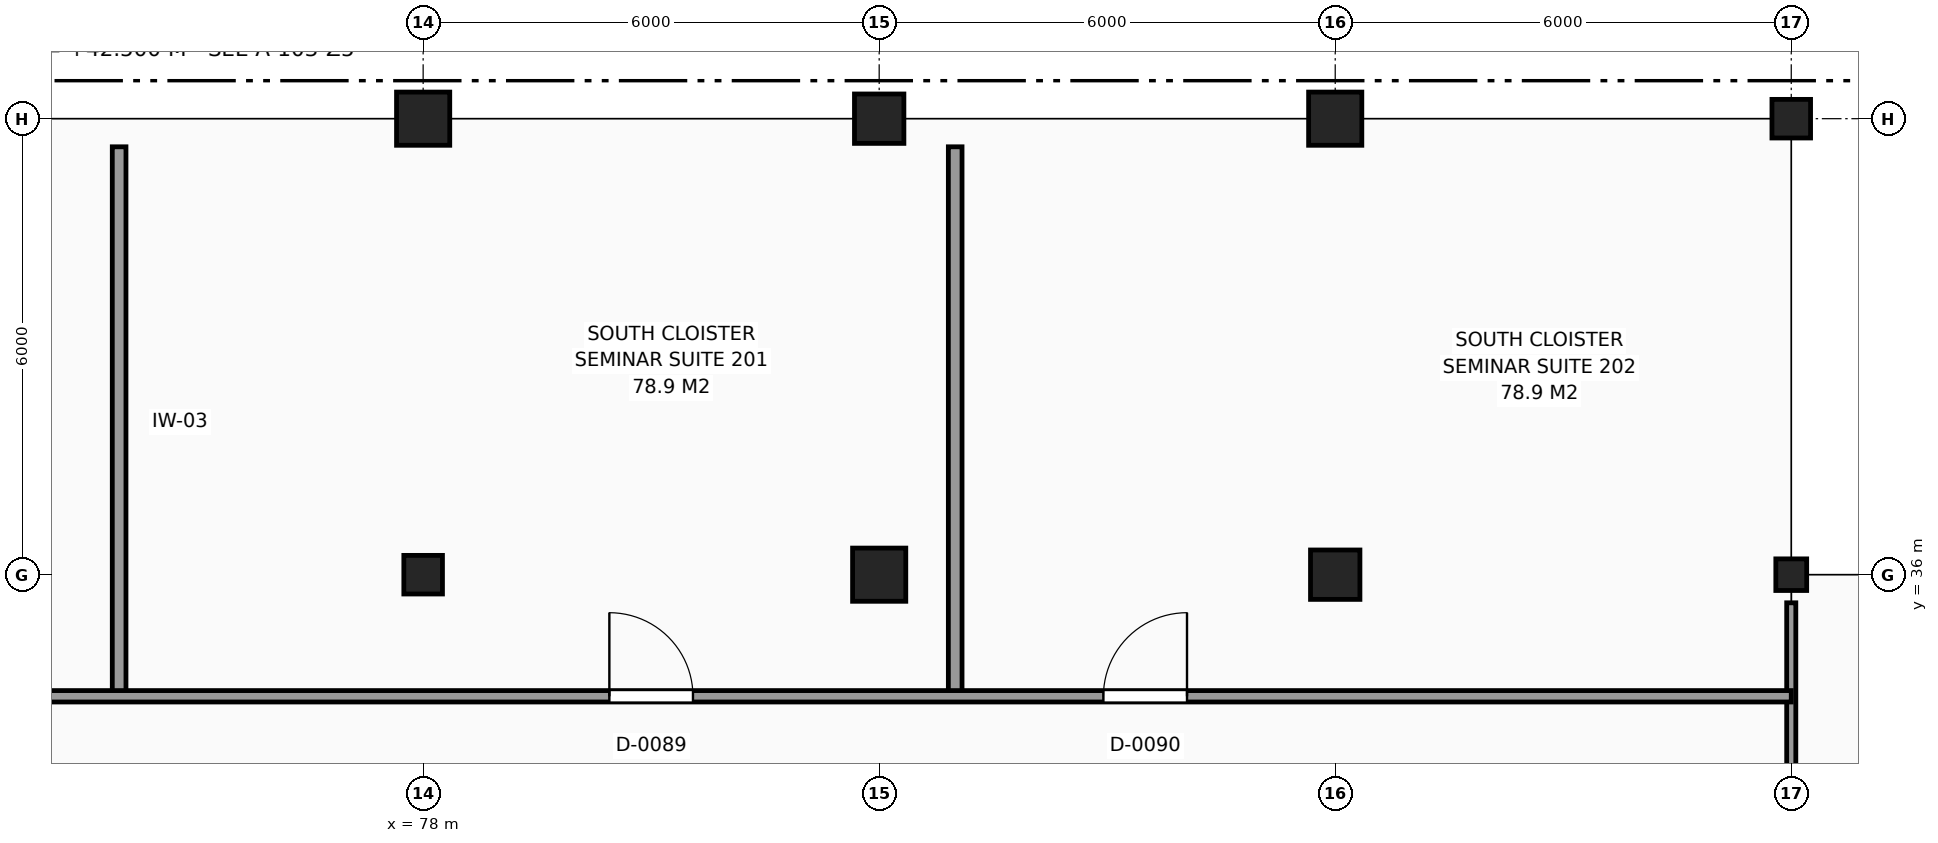
"""IFC4 building model, lengths in metres.
Left out: names, types, materials, properties, quantities, classifications, styles, units other than length and angle.
Written with IfcOpenShell. Run it as: python <this file> out.ifc"""

import sys

from ifc_helpers import new_model, si_unit, direction, frame, frame_2d, origin, origin_2d, place, context, subcontext, project, spatial, rectangle, circle, hollow_circle, i_section, extrude, element, fill, save


model = new_model("IFC4")
c1 = context("Model", 3, precision=1e-05, world=origin(), true_north=direction((0.0, 1.0)))
c2 = subcontext(c1, "Body", "Model", "MODEL_VIEW")
j1 = project(units=[si_unit("LENGTHUNIT", "METRE"), si_unit("PLANEANGLEUNIT", "RADIAN")], contexts=[c1])
p1 = place(None, origin())
s1 = spatial("IfcSite", under=j1, at=p1, CompositionType="ELEMENT")
p2 = place(p1, origin())
s2 = spatial("IfcBuilding", under=s1, at=p2, CompositionType="ELEMENT")
p3 = place(p2, frame((0.0, 0.0, 10.5)))
s3 = spatial("IfcBuildingStorey", under=s2, at=p3, CompositionType="ELEMENT", Elevation=10.5)
p4 = place(p3, frame((78.0, 36.0, 0.0), z_axis=(0.0, 0.0, 1.0), x_axis=(1.0, 0.0, 0.0)))
e1 = element("IfcColumn", 1, at=p4, inside=s3, PredefinedType="COLUMN", context=c2, shape_type="SweptSolid", body=[
    extrude(hollow_circle(Radius=0.254, WallThickness=0.025, at=origin_2d()), origin(), (0.0, 0.0, 1.0), 4.5),
])
for number, where, z_axis, x_axis in (
    (2, (78.0, 42.0, 0.0), (0.0, 0.0, 1.0), (1.0, 0.0, 0.0)),
    (3, (84.0, 36.0, 0.0), (0.0, 0.0, 1.0), (1.0, 0.0, 0.0)),
):
    element("IfcColumn", number, at=place(p3, frame(where, z_axis=z_axis, x_axis=x_axis)), inside=s3, PredefinedType="COLUMN", context=c2, shape_type="SweptSolid", body=[
        extrude(rectangle(XDim=0.7, YDim=0.7, at=origin_2d()), origin(), (0.0, 0.0, 1.0), 4.5),
    ])
for number, where, z_axis, x_axis in (
    (4, (84.0, 42.0, 0.0), (0.0, 0.0, 1.0), (1.0, 0.0, 0.0)),
    (5, (90.0, 36.0, 0.0), (0.0, 0.0, 1.0), (1.0, 0.0, 0.0)),
):
    element("IfcColumn", number, at=place(p3, frame(where, z_axis=z_axis, x_axis=x_axis)), inside=s3, PredefinedType="COLUMN", context=c2, shape_type="SweptSolid", body=[
        extrude(rectangle(XDim=0.65, YDim=0.65, at=origin_2d()), origin(), (0.0, 0.0, 1.0), 4.5),
    ])
p5 = place(p3, frame((90.0, 42.0, 0.0), z_axis=(0.0, 0.0, 1.0), x_axis=(1.0, 0.0, 0.0)))
e6 = element("IfcColumn", 6, at=p5, inside=s3, PredefinedType="COLUMN", context=c2, shape_type="SweptSolid", body=[
    extrude(circle(Radius=0.35, at=origin_2d()), origin(), (0.0, 0.0, 1.0), 4.5),
])
p6 = place(p3, frame((96.0, 36.0, 0.0), z_axis=(0.0, 0.0, 1.0), x_axis=(1.0, 0.0, 0.0)))
e7 = element("IfcColumn", 7, at=p6, inside=s3, PredefinedType="COLUMN", context=c2, shape_type="SweptSolid", body=[
    extrude(i_section(OverallWidth=0.406, OverallDepth=0.416, WebThickness=0.021, FlangeThickness=0.035, FilletRadius=0.015, at=origin_2d()), origin(), (0.0, 0.0, 1.0), 4.5),
])
p7 = place(p3, frame((96.0, 42.0, 0.0), z_axis=(0.0, 0.0, 1.0), x_axis=(1.0, 0.0, 0.0)))
e8 = element("IfcColumn", 8, at=p7, inside=s3, PredefinedType="COLUMN", context=c2, shape_type="SweptSolid", body=[
    extrude(hollow_circle(Radius=0.254, WallThickness=0.025, at=origin_2d()), origin(), (0.0, 0.0, 1.0), 4.5),
])
for number, where, z_axis, x_axis in (
    (9, (74.0, 34.4, 0.0), (0.0, 0.0, 1.0), (0.0, 1.0, 0.0)),
    (10, (85.0, 34.4, 0.0), (0.0, 0.0, 1.0), (0.0, 1.0, 0.0)),
):
    element("IfcWall", number, at=place(p3, frame(where, z_axis=z_axis, x_axis=x_axis)), inside=s3, PredefinedType="PARTITIONING", context=c2, shape_type="SweptSolid", body=[
        extrude(rectangle(XDim=7.23, YDim=0.18, at=frame_2d((3.615, 0.0))), origin(), (0.0, 0.0, 1.0), 4.24),
    ])
p8 = place(p3, frame((96.0, 30.37, 0.0), z_axis=(0.0, 0.0, 1.0), x_axis=(0.0, 1.0, 0.0)))
e11 = element("IfcWall", 11, at=p8, inside=s3, PredefinedType="PARTITIONING", context=c2, shape_type="SweptSolid", body=[
    extrude(rectangle(XDim=5.26, YDim=0.12, at=frame_2d((2.63, 0.0))), origin(), (0.0, 0.0, 1.0), 3.49),
])
p9 = place(p3, frame((54.045, 34.4, 0.0), z_axis=(0.0, 0.0, 1.0), x_axis=(1.0, 0.0, 0.0)))
e12 = element("IfcWall", 12, at=p9, inside=s3, PredefinedType="PARTITIONING", context=c2, shape_type="SweptSolid", body=[
    extrude(rectangle(XDim=41.955, YDim=0.15, at=frame_2d((20.978, 0.0))), origin(), (0.0, 0.0, 1.0), 4.24),
])
p10 = place(p9, frame((26.405, 0.0, 0.0)))
e13 = element("IfcOpeningElement", 13, at=p10, cuts=e12, PredefinedType="OPENING", context=c2, shape_type="SweptSolid", body=[
    extrude(rectangle(XDim=1.1, YDim=2.15, at=frame_2d((0.55, 1.075))), frame((0.0, 0.085, 0.0), z_axis=(0.0, -1.0, 0.0), x_axis=(1.0, 0.0, 0.0)), (0.0, 0.0, 1.0), 0.17),
])
p11 = place(p9, frame((32.905, 0.0, 0.0)))
e14 = element("IfcOpeningElement", 14, at=p11, cuts=e12, PredefinedType="OPENING", context=c2, shape_type="SweptSolid", body=[
    extrude(rectangle(XDim=1.1, YDim=2.15, at=frame_2d((0.55, 1.075))), frame((0.0, 0.085, 0.0), z_axis=(0.0, -1.0, 0.0), x_axis=(1.0, 0.0, 0.0)), (0.0, 0.0, 1.0), 0.17),
])
p12 = place(p9, frame((1.475, 0.0, 0.0)))
e15 = element("IfcOpeningElement", 15, at=p12, cuts=e12, PredefinedType="OPENING", context=c2, shape_type="SweptSolid", body=[
    extrude(rectangle(XDim=1.6, YDim=2.25, at=frame_2d((0.8, 1.125))), frame((0.0, 0.085, 0.0), z_axis=(0.0, -1.0, 0.0), x_axis=(1.0, 0.0, 0.0)), (0.0, 0.0, 1.0), 0.17),
])
p13 = place(p10, origin())
e16 = element("IfcDoor", 16, at=p13, inside=s3, OperationType="SINGLE_SWING_LEFT", PredefinedType="DOOR", context=c2, shape_type="SweptSolid", body=[
    extrude(rectangle(XDim=1.1, YDim=2.15, at=frame_2d((0.55, 1.075))), frame((0.0, 0.025, 0.0), z_axis=(0.0, -1.0, 0.0), x_axis=(1.0, 0.0, 0.0)), (0.0, 0.0, 1.0), 0.05),
])
fill(e13, e16)
p14 = place(p11, origin())
e17 = element("IfcDoor", 17, at=p14, inside=s3, OperationType="SINGLE_SWING_RIGHT", PredefinedType="DOOR", context=c2, shape_type="SweptSolid", body=[
    extrude(rectangle(XDim=1.1, YDim=2.15, at=frame_2d((0.55, 1.075))), frame((0.0, 0.025, 0.0), z_axis=(0.0, -1.0, 0.0), x_axis=(1.0, 0.0, 0.0)), (0.0, 0.0, 1.0), 0.05),
])
fill(e14, e17)
save(model, sys.argv[1])
